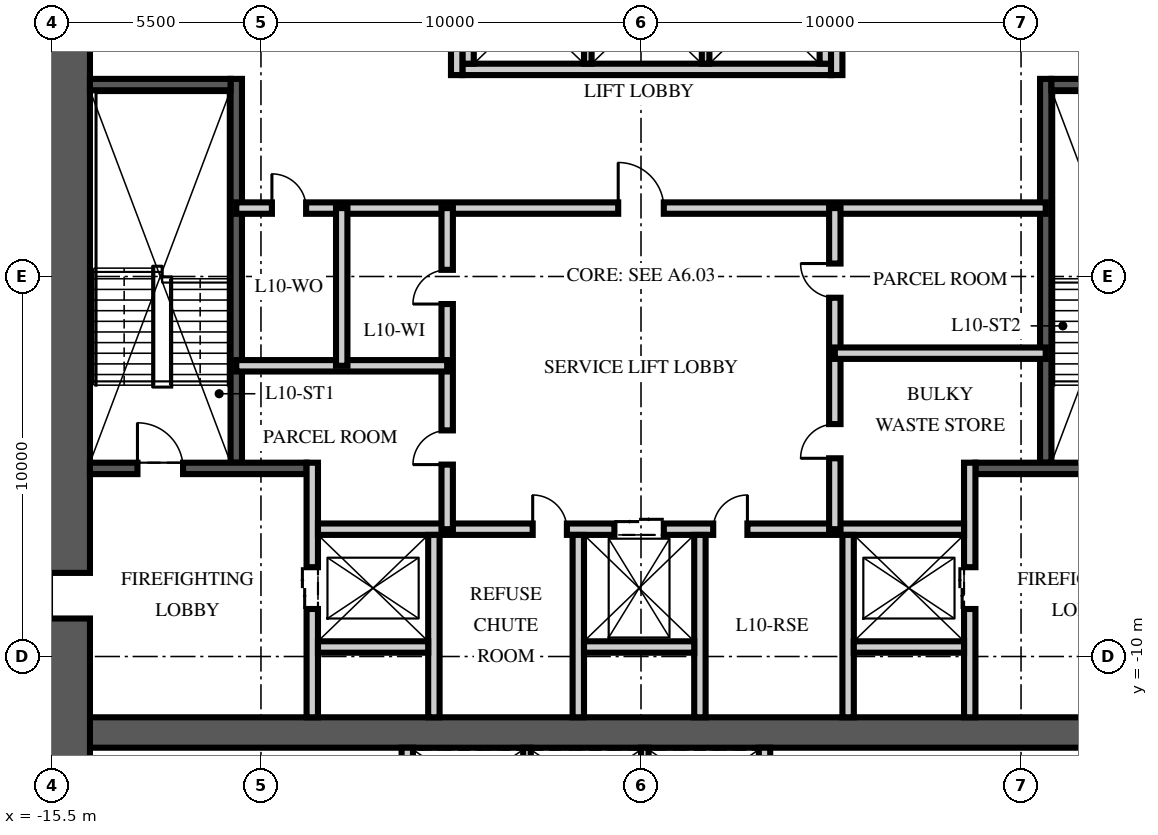
"""IFC4 building model, lengths in metres.
Left out: names, types, materials, properties, quantities, classifications, styles, units other than length and angle.
Written with IfcOpenShell. Run it as: python <this file> out.ifc"""

import sys

from ifc_helpers import new_model, si_unit, direction, frame, frame_2d, origin, place, context, subcontext, project, spatial, rectangle, extrude, element, fill, save


model = new_model("IFC4")
c1 = context("Model", 3, precision=1e-05, world=origin(), true_north=direction((0.0, 1.0)))
c2 = subcontext(c1, "Body", "Model", "MODEL_VIEW")
j1 = project(units=[si_unit("LENGTHUNIT", "METRE"), si_unit("PLANEANGLEUNIT", "RADIAN")], contexts=[c1])
p1 = place(None, origin())
s1 = spatial("IfcSite", under=j1, at=p1, CompositionType="ELEMENT")
p2 = place(p1, origin())
s2 = spatial("IfcBuilding", under=s1, at=p2, CompositionType="ELEMENT")
p3 = place(p2, frame((0.0, 0.0, 43.5)))
s3 = spatial("IfcBuildingStorey", under=s2, at=p3, CompositionType="ELEMENT", Elevation=43.5)
p4 = place(p3, frame((-15.5, -12.0, -0.25), z_axis=(0.0, 0.0, 1.0), x_axis=(1.0, 0.0, 0.0)))
e1 = element("IfcWall", 1, at=p4, inside=s3, PredefinedType="SHEAR", context=c2, shape_type="SweptSolid", body=[
    extrude(rectangle(XDim=31.0, YDim=0.8, at=frame_2d((15.5, 0.0))), origin(), (0.0, 0.0, 1.0), 3.75),
])
p5 = place(p3, frame((-15.5, -15.5, -0.25), z_axis=(0.0, 0.0, 1.0), x_axis=(0.0, 1.0, 0.0)))
e2 = element("IfcWall", 2, at=p5, inside=s3, PredefinedType="SHEAR", context=c2, shape_type="SweptSolid", body=[
    extrude(rectangle(XDim=31.0, YDim=2.0, at=frame_2d((15.5, 0.0))), origin(), (0.0, 0.0, 1.0), 3.75),
])
p6 = place(p5, frame((6.5, 0.0, 0.25)))
e3 = element("IfcOpeningElement", 3, at=p6, cuts=e2, PredefinedType="OPENING", context=c2, shape_type="SweptSolid", body=[
    extrude(rectangle(XDim=1.2, YDim=2.1, at=frame_2d((0.6, 1.05))), frame((0.0, 1.01, 0.0), z_axis=(0.0, -1.0, 0.0), x_axis=(1.0, 0.0, 0.0)), (0.0, 0.0, 1.0), 2.02),
])
p7 = place(p5, frame((23.0, 0.0, 0.25)))
e4 = element("IfcOpeningElement", 4, at=p7, cuts=e2, PredefinedType="OPENING", context=c2, shape_type="SweptSolid", body=[
    extrude(rectangle(XDim=1.8, YDim=2.1, at=frame_2d((0.9, 1.05))), frame((0.0, 1.01, 0.0), z_axis=(0.0, -1.0, 0.0), x_axis=(1.0, 0.0, 0.0)), (0.0, 0.0, 1.0), 2.02),
])
p8 = place(p3, frame((-10.65, -4.9, 0.0), z_axis=(0.0, 0.0, 1.0), x_axis=(0.0, 1.0, 0.0)))
e5 = element("IfcWall", 5, at=p8, inside=s3, PredefinedType="SOLIDWALL", context=c2, shape_type="SweptSolid", body=[
    extrude(rectangle(XDim=10.1, YDim=0.3, at=frame_2d((5.05, 0.0))), origin(), (0.0, 0.0, 1.0), 3.5),
])
p9 = place(p3, frame((-14.5, -5.05, 0.0), z_axis=(0.0, 0.0, 1.0), x_axis=(1.0, 0.0, 0.0)))
e6 = element("IfcWall", 6, at=p9, inside=s3, PredefinedType="SOLIDWALL", context=c2, shape_type="SweptSolid", body=[
    extrude(rectangle(XDim=5.7, YDim=0.3, at=frame_2d((2.85, 0.0))), origin(), (0.0, 0.0, 1.0), 3.5),
])
p10 = place(p9, frame((1.25, 0.0, 0.0)))
e7 = element("IfcOpeningElement", 7, at=p10, cuts=e6, PredefinedType="OPENING", context=c2, shape_type="SweptSolid", body=[
    extrude(rectangle(XDim=1.2, YDim=2.1, at=frame_2d((0.6, 1.05))), frame((0.0, 0.16, 0.0), z_axis=(0.0, -1.0, 0.0), x_axis=(1.0, 0.0, 0.0)), (0.0, 0.0, 1.0), 0.32),
])
p11 = place(p3, frame((-14.5, 5.05, 0.0), z_axis=(0.0, 0.0, 1.0), x_axis=(1.0, 0.0, 0.0)))
e8 = element("IfcWall", 8, at=p11, inside=s3, PredefinedType="SOLIDWALL", context=c2, shape_type="SweptSolid", body=[
    extrude(rectangle(XDim=3.7, YDim=0.3, at=frame_2d((1.85, 0.0))), origin(), (0.0, 0.0, 1.0), 3.5),
])
p12 = place(p3, frame((-8.65, -11.6, 0.0), z_axis=(0.0, 0.0, 1.0), x_axis=(0.0, 1.0, 0.0)))
e9 = element("IfcWall", 9, at=p12, inside=s3, PredefinedType="PARTITIONING", context=c2, shape_type="SweptSolid", body=[
    extrude(rectangle(XDim=6.7, YDim=0.3, at=frame_2d((3.35, 0.0))), origin(), (0.0, 0.0, 1.0), 3.5),
])
p13 = place(p12, frame((2.85, 0.0, 0.0)))
e10 = element("IfcOpeningElement", 10, at=p13, cuts=e9, PredefinedType="OPENING", context=c2, shape_type="SweptSolid", body=[
    extrude(rectangle(XDim=1.1, YDim=2.1, at=frame_2d((0.55, 1.05))), frame((0.0, 0.16, 0.0), z_axis=(0.0, -1.0, 0.0), x_axis=(1.0, 0.0, 0.0)), (0.0, 0.0, 1.0), 0.32),
])
p14 = place(p3, frame((10.65, -4.9, 0.0), z_axis=(0.0, 0.0, 1.0), x_axis=(0.0, 1.0, 0.0)))
e11 = element("IfcWall", 11, at=p14, inside=s3, PredefinedType="SOLIDWALL", context=c2, shape_type="SweptSolid", body=[
    extrude(rectangle(XDim=10.1, YDim=0.3, at=frame_2d((5.05, 0.0))), origin(), (0.0, 0.0, 1.0), 3.5),
])
p15 = place(p3, frame((14.5, -5.05, 0.0), z_axis=(0.0, 0.0, 1.0), x_axis=(-1.0, 0.0, 0.0)))
e12 = element("IfcWall", 12, at=p15, inside=s3, PredefinedType="SOLIDWALL", context=c2, shape_type="SweptSolid", body=[
    extrude(rectangle(XDim=5.7, YDim=0.3, at=frame_2d((2.85, 0.0))), origin(), (0.0, 0.0, 1.0), 3.5),
])
p16 = place(p15, frame((1.25, 0.0, 0.0)))
e13 = element("IfcOpeningElement", 13, at=p16, cuts=e12, PredefinedType="OPENING", context=c2, shape_type="SweptSolid", body=[
    extrude(rectangle(XDim=1.2, YDim=2.1, at=frame_2d((0.6, 1.05))), frame((0.0, 0.16, 0.0), z_axis=(0.0, -1.0, 0.0), x_axis=(1.0, 0.0, 0.0)), (0.0, 0.0, 1.0), 0.32),
])
p17 = place(p3, frame((14.5, 5.05, 0.0), z_axis=(0.0, 0.0, 1.0), x_axis=(-1.0, 0.0, 0.0)))
e14 = element("IfcWall", 14, at=p17, inside=s3, PredefinedType="SOLIDWALL", context=c2, shape_type="SweptSolid", body=[
    extrude(rectangle(XDim=3.7, YDim=0.3, at=frame_2d((1.85, 0.0))), origin(), (0.0, 0.0, 1.0), 3.5),
])
p18 = place(p3, frame((8.65, -11.6, 0.0), z_axis=(0.0, 0.0, 1.0), x_axis=(0.0, 1.0, 0.0)))
e15 = element("IfcWall", 15, at=p18, inside=s3, PredefinedType="PARTITIONING", context=c2, shape_type="SweptSolid", body=[
    extrude(rectangle(XDim=6.7, YDim=0.3, at=frame_2d((3.35, 0.0))), origin(), (0.0, 0.0, 1.0), 3.5),
])
p19 = place(p18, frame((2.85, 0.0, 0.0)))
e16 = element("IfcOpeningElement", 16, at=p19, cuts=e15, PredefinedType="OPENING", context=c2, shape_type="SweptSolid", body=[
    extrude(rectangle(XDim=1.1, YDim=2.1, at=frame_2d((0.55, 1.05))), frame((0.0, 0.16, 0.0), z_axis=(0.0, -1.0, 0.0), x_axis=(1.0, 0.0, 0.0)), (0.0, 0.0, 1.0), 0.32),
])
p20 = place(p3, frame((-8.5, -6.65, 0.0), z_axis=(0.0, 0.0, 1.0), x_axis=(1.0, 0.0, 0.0)))
e17 = element("IfcWall", 17, at=p20, inside=s3, PredefinedType="PARTITIONING", context=c2, shape_type="SweptSolid", body=[
    extrude(rectangle(XDim=17.0, YDim=0.3, at=frame_2d((8.5, 0.0))), origin(), (0.0, 0.0, 1.0), 3.5),
])
p21 = place(p20, frame((7.8, 0.0, 0.0)))
e18 = element("IfcOpeningElement", 18, at=p21, cuts=e17, PredefinedType="OPENING", context=c2, shape_type="SweptSolid", body=[
    extrude(rectangle(XDim=1.3, YDim=2.4, at=frame_2d((0.65, 1.2))), frame((0.0, 0.16, 0.0), z_axis=(0.0, -1.0, 0.0), x_axis=(1.0, 0.0, 0.0)), (0.0, 0.0, 1.0), 0.32),
])
p22 = place(p20, frame((5.65, 0.0, 0.0)))
e19 = element("IfcOpeningElement", 19, at=p22, cuts=e17, PredefinedType="OPENING", context=c2, shape_type="SweptSolid", body=[
    extrude(rectangle(XDim=0.9, YDim=2.1, at=frame_2d((0.45, 1.05))), frame((0.0, 0.16, 0.0), z_axis=(0.0, -1.0, 0.0), x_axis=(1.0, 0.0, 0.0)), (0.0, 0.0, 1.0), 0.32),
])
p23 = place(p20, frame((10.4, 0.0, 0.0)))
e20 = element("IfcOpeningElement", 20, at=p23, cuts=e17, PredefinedType="OPENING", context=c2, shape_type="SweptSolid", body=[
    extrude(rectangle(XDim=0.9, YDim=2.1, at=frame_2d((0.45, 1.05))), frame((0.0, 0.16, 0.0), z_axis=(0.0, -1.0, 0.0), x_axis=(1.0, 0.0, 0.0)), (0.0, 0.0, 1.0), 0.32),
])
for number, where, z_axis, x_axis in (
    (21, (-5.45, -11.6, 0.0), (0.0, 0.0, 1.0), (0.0, 1.0, 0.0)),
    (22, (-1.65, -11.6, 0.0), (0.0, 0.0, 1.0), (0.0, 1.0, 0.0)),
    (23, (1.55, -11.6, 0.0), (0.0, 0.0, 1.0), (0.0, 1.0, 0.0)),
    (24, (5.45, -11.6, 0.0), (0.0, 0.0, 1.0), (0.0, 1.0, 0.0)),
):
    element("IfcWall", number, at=place(p3, frame(where, z_axis=z_axis, x_axis=x_axis)), inside=s3, PredefinedType="PARTITIONING", context=c2, shape_type="SweptSolid", body=[
        extrude(rectangle(XDim=4.8, YDim=0.3, at=frame_2d((2.4, 0.0))), origin(), (0.0, 0.0, 1.0), 3.5),
    ])
for number, where, z_axis, x_axis in (
    (25, (-8.5, -9.75, 0.0), (0.0, 0.0, 1.0), (1.0, 0.0, 0.0)),
    (26, (-1.5, -9.75, 0.0), (0.0, 0.0, 1.0), (1.0, 0.0, 0.0)),
    (27, (5.6, -9.75, 0.0), (0.0, 0.0, 1.0), (1.0, 0.0, 0.0)),
):
    element("IfcWall", number, at=place(p3, frame(where, z_axis=z_axis, x_axis=x_axis)), inside=s3, PredefinedType="PARTITIONING", context=c2, shape_type="SweptSolid", body=[
        extrude(rectangle(XDim=2.9, YDim=0.3, at=frame_2d((1.45, 0.0))), origin(), (0.0, 0.0, 1.0), 3.5),
    ])
p24 = place(p3, frame((-4.7, 5.45, 0.0), z_axis=(0.0, 0.0, 1.0), x_axis=(1.0, 0.0, 0.0)))
e28 = element("IfcWall", 28, at=p24, inside=s3, PredefinedType="PARTITIONING", context=c2, shape_type="SweptSolid", body=[
    extrude(rectangle(XDim=9.7, YDim=0.3, at=frame_2d((4.85, 0.0))), origin(), (0.0, 0.0, 1.0), 3.5),
])
for number, where, z_axis, x_axis in (
    (29, (-4.55, 5.6, 0.0), (0.0, 0.0, 1.0), (0.0, 1.0, 0.0)),
    (30, (4.85, 5.6, 0.0), (0.0, 0.0, 1.0), (0.0, 1.0, 0.0)),
):
    element("IfcWall", number, at=place(p3, frame(where, z_axis=z_axis, x_axis=x_axis)), inside=s3, PredefinedType="PARTITIONING", context=c2, shape_type="SweptSolid", body=[
        extrude(rectangle(XDim=2.8, YDim=0.3, at=frame_2d((1.4, 0.0))), origin(), (0.0, 0.0, 1.0), 3.5),
    ])
for number, where, z_axis, x_axis in (
    (31, (-1.4, 5.6, 0.0), (0.0, 0.0, 1.0), (0.0, 1.0, 0.0)),
    (32, (1.7, 5.6, 0.0), (0.0, 0.0, 1.0), (0.0, 1.0, 0.0)),
):
    element("IfcWall", number, at=place(p3, frame(where, z_axis=z_axis, x_axis=x_axis)), inside=s3, PredefinedType="PARTITIONING", context=c2, shape_type="SweptSolid", body=[
        extrude(rectangle(XDim=2.8, YDim=0.2, at=frame_2d((1.4, 0.0))), origin(), (0.0, 0.0, 1.0), 3.5),
    ])
for number, where, z_axis, x_axis in (
    (33, (-6.15, -14.5, 0.0), (0.0, 0.0, 1.0), (0.0, 1.0, 0.0)),
    (34, (3.25, -14.5, 0.0), (0.0, 0.0, 1.0), (0.0, 1.0, 0.0)),
):
    element("IfcWall", number, at=place(p3, frame(where, z_axis=z_axis, x_axis=x_axis)), inside=s3, PredefinedType="PARTITIONING", context=c2, shape_type="SweptSolid", body=[
        extrude(rectangle(XDim=2.1, YDim=0.3, at=frame_2d((1.05, 0.0))), origin(), (0.0, 0.0, 1.0), 3.5),
    ])
for number, where, z_axis, x_axis in (
    (35, (-3.0, -14.5, 0.0), (0.0, 0.0, 1.0), (0.0, 1.0, 0.0)),
    (36, (0.1, -14.5, 0.0), (0.0, 0.0, 1.0), (0.0, 1.0, 0.0)),
):
    element("IfcWall", number, at=place(p3, frame(where, z_axis=z_axis, x_axis=x_axis)), inside=s3, PredefinedType="PARTITIONING", context=c2, shape_type="SweptSolid", body=[
        extrude(rectangle(XDim=2.1, YDim=0.2, at=frame_2d((1.05, 0.0))), origin(), (0.0, 0.0, 1.0), 3.5),
    ])
p25 = place(p3, frame((-10.65, 1.8, 0.0), z_axis=(0.0, 0.0, 1.0), x_axis=(1.0, 0.0, 0.0)))
e37 = element("IfcWall", 37, at=p25, inside=s3, PredefinedType="PARTITIONING", context=c2, shape_type="SweptSolid", body=[
    extrude(rectangle(XDim=21.3, YDim=0.3, at=frame_2d((10.65, 0.0))), origin(), (0.0, 0.0, 1.0), 3.5),
])
p26 = place(p25, frame((10.05, 0.0, 0.0)))
e38 = element("IfcOpeningElement", 38, at=p26, cuts=e37, PredefinedType="OPENING", context=c2, shape_type="SweptSolid", body=[
    extrude(rectangle(XDim=1.2, YDim=2.1, at=frame_2d((0.6, 1.05))), frame((0.0, 0.16, 0.0), z_axis=(0.0, -1.0, 0.0), x_axis=(1.0, 0.0, 0.0)), (0.0, 0.0, 1.0), 0.32),
])
p27 = place(p25, frame((0.938, 0.0, 0.0)))
e39 = element("IfcOpeningElement", 39, at=p27, cuts=e37, PredefinedType="OPENING", context=c2, shape_type="SweptSolid", body=[
    extrude(rectangle(XDim=0.9, YDim=2.1, at=frame_2d((0.45, 1.05))), frame((0.0, 0.16, 0.0), z_axis=(0.0, -1.0, 0.0), x_axis=(1.0, 0.0, 0.0)), (0.0, 0.0, 1.0), 0.32),
])
p28 = place(p3, frame((-5.1, -6.65, 0.0), z_axis=(0.0, 0.0, 1.0), x_axis=(0.0, 1.0, 0.0)))
e40 = element("IfcWall", 40, at=p28, inside=s3, PredefinedType="PARTITIONING", context=c2, shape_type="SweptSolid", body=[
    extrude(rectangle(XDim=8.45, YDim=0.3, at=frame_2d((4.225, 0.0))), origin(), (0.0, 0.0, 1.0), 3.5),
])
p29 = place(p28, frame((1.7, 0.0, 0.0)))
e41 = element("IfcOpeningElement", 41, at=p29, cuts=e40, PredefinedType="OPENING", context=c2, shape_type="SweptSolid", body=[
    extrude(rectangle(XDim=0.9, YDim=2.1, at=frame_2d((0.45, 1.05))), frame((0.0, 0.16, 0.0), z_axis=(0.0, -1.0, 0.0), x_axis=(1.0, 0.0, 0.0)), (0.0, 0.0, 1.0), 0.32),
])
p30 = place(p28, frame((5.925, 0.0, 0.0)))
e42 = element("IfcOpeningElement", 42, at=p30, cuts=e40, PredefinedType="OPENING", context=c2, shape_type="SweptSolid", body=[
    extrude(rectangle(XDim=0.9, YDim=2.1, at=frame_2d((0.45, 1.05))), frame((0.0, 0.16, 0.0), z_axis=(0.0, -1.0, 0.0), x_axis=(1.0, 0.0, 0.0)), (0.0, 0.0, 1.0), 0.32),
])
p31 = place(p3, frame((5.1, -6.65, 0.0), z_axis=(0.0, 0.0, 1.0), x_axis=(0.0, 1.0, 0.0)))
e43 = element("IfcWall", 43, at=p31, inside=s3, PredefinedType="PARTITIONING", context=c2, shape_type="SweptSolid", body=[
    extrude(rectangle(XDim=8.45, YDim=0.3, at=frame_2d((4.225, 0.0))), origin(), (0.0, 0.0, 1.0), 3.5),
])
p32 = place(p31, frame((1.866, 0.0, 0.0)))
e44 = element("IfcOpeningElement", 44, at=p32, cuts=e43, PredefinedType="OPENING", context=c2, shape_type="SweptSolid", body=[
    extrude(rectangle(XDim=0.9, YDim=2.1, at=frame_2d((0.45, 1.05))), frame((0.0, 0.16, 0.0), z_axis=(0.0, -1.0, 0.0), x_axis=(1.0, 0.0, 0.0)), (0.0, 0.0, 1.0), 0.32),
])
p33 = place(p31, frame((6.091, 0.0, 0.0)))
e45 = element("IfcOpeningElement", 45, at=p33, cuts=e43, PredefinedType="OPENING", context=c2, shape_type="SweptSolid", body=[
    extrude(rectangle(XDim=0.9, YDim=2.1, at=frame_2d((0.45, 1.05))), frame((0.0, 0.16, 0.0), z_axis=(0.0, -1.0, 0.0), x_axis=(1.0, 0.0, 0.0)), (0.0, 0.0, 1.0), 0.32),
])
p34 = place(p3, frame((-10.65, -2.35, 0.0), z_axis=(0.0, 0.0, 1.0), x_axis=(1.0, 0.0, 0.0)))
e46 = element("IfcWall", 46, at=p34, inside=s3, PredefinedType="PARTITIONING", context=c2, shape_type="SweptSolid", body=[
    extrude(rectangle(XDim=5.55, YDim=0.3, at=frame_2d((2.775, 0.0))), origin(), (0.0, 0.0, 1.0), 3.5),
])
p35 = place(p3, frame((-7.875, -2.35, 0.0), z_axis=(0.0, 0.0, 1.0), x_axis=(0.0, 1.0, 0.0)))
e47 = element("IfcWall", 47, at=p35, inside=s3, PredefinedType="PARTITIONING", context=c2, shape_type="SweptSolid", body=[
    extrude(rectangle(XDim=4.15, YDim=0.3, at=frame_2d((2.075, 0.0))), origin(), (0.0, 0.0, 1.0), 3.5),
])
p36 = place(p3, frame((10.65, -2.018, 0.0), z_axis=(0.0, 0.0, 1.0), x_axis=(-1.0, 0.0, 0.0)))
e48 = element("IfcWall", 48, at=p36, inside=s3, PredefinedType="PARTITIONING", context=c2, shape_type="SweptSolid", body=[
    extrude(rectangle(XDim=5.55, YDim=0.3, at=frame_2d((2.775, 0.0))), origin(), (0.0, 0.0, 1.0), 3.5),
])
p37 = place(p3, frame((-4.85, 5.3, 0.0), z_axis=(0.0, 0.0, 1.0), x_axis=(0.0, 1.0, 0.0)))
e49 = element("IfcWall", 49, at=p37, inside=s3, PredefinedType="PARTITIONING", context=c2, shape_type="SweptSolid", body=[
    extrude(rectangle(XDim=6.3, YDim=0.3, at=frame_2d((3.15, 0.0))), origin(), (0.0, 0.0, 1.0), 3.5),
])
p38 = place(p37, frame((4.35, 0.0, 0.0)))
e50 = element("IfcOpeningElement", 50, at=p38, cuts=e49, PredefinedType="OPENING", context=c2, shape_type="SweptSolid", body=[
    extrude(rectangle(XDim=0.9, YDim=2.1, at=frame_2d((0.45, 1.05))), frame((0.0, 0.16, 0.0), z_axis=(0.0, -1.0, 0.0), x_axis=(1.0, 0.0, 0.0)), (0.0, 0.0, 1.0), 0.32),
])
p39 = place(p3, frame((5.15, 5.3, 0.0), z_axis=(0.0, 0.0, 1.0), x_axis=(0.0, 1.0, 0.0)))
e51 = element("IfcWall", 51, at=p39, inside=s3, PredefinedType="PARTITIONING", context=c2, shape_type="SweptSolid", body=[
    extrude(rectangle(XDim=6.3, YDim=0.3, at=frame_2d((3.15, 0.0))), origin(), (0.0, 0.0, 1.0), 3.5),
])
p40 = place(p10, origin())
e52 = element("IfcDoor", 52, at=p40, inside=s3, OperationType="SINGLE_SWING_LEFT", PredefinedType="DOOR", context=c2, shape_type="SweptSolid", body=[
    extrude(rectangle(XDim=1.2, YDim=2.1, at=frame_2d((0.6, 1.05))), frame((0.0, 0.025, 0.0), z_axis=(0.0, -1.0, 0.0), x_axis=(1.0, 0.0, 0.0)), (0.0, 0.0, 1.0), 0.05),
])
fill(e7, e52)
p41 = place(p6, origin())
e53 = element("IfcDoor", 53, at=p41, inside=s3, OperationType="SINGLE_SWING_LEFT", PredefinedType="DOOR", context=c2, shape_type="SweptSolid", body=[
    extrude(rectangle(XDim=1.2, YDim=2.1, at=frame_2d((0.6, 1.05))), frame((0.0, 0.025, 0.0), z_axis=(0.0, -1.0, 0.0), x_axis=(1.0, 0.0, 0.0)), (0.0, 0.0, 1.0), 0.05),
])
fill(e3, e53)
p42 = place(p13, origin())
e54 = element("IfcDoor", 54, at=p42, inside=s3, OperationType="DOUBLE_DOOR_SLIDING", PredefinedType="DOOR", context=c2, shape_type="SweptSolid", body=[
    extrude(rectangle(XDim=1.1, YDim=2.1, at=frame_2d((0.55, 1.05))), frame((0.0, 0.025, 0.0), z_axis=(0.0, -1.0, 0.0), x_axis=(1.0, 0.0, 0.0)), (0.0, 0.0, 1.0), 0.05),
])
fill(e10, e54)
p43 = place(p19, origin())
e55 = element("IfcDoor", 55, at=p43, inside=s3, OperationType="DOUBLE_DOOR_SLIDING", PredefinedType="DOOR", context=c2, shape_type="SweptSolid", body=[
    extrude(rectangle(XDim=1.1, YDim=2.1, at=frame_2d((0.55, 1.05))), frame((0.0, 0.025, 0.0), z_axis=(0.0, -1.0, 0.0), x_axis=(1.0, 0.0, 0.0)), (0.0, 0.0, 1.0), 0.05),
])
fill(e16, e55)
p44 = place(p21, origin())
e56 = element("IfcDoor", 56, at=p44, inside=s3, OperationType="DOUBLE_DOOR_SLIDING", PredefinedType="DOOR", context=c2, shape_type="SweptSolid", body=[
    extrude(rectangle(XDim=1.3, YDim=2.4, at=frame_2d((0.65, 1.2))), frame((0.0, 0.025, 0.0), z_axis=(0.0, -1.0, 0.0), x_axis=(1.0, 0.0, 0.0)), (0.0, 0.0, 1.0), 0.05),
])
fill(e18, e56)
p45 = place(p26, origin())
e57 = element("IfcDoor", 57, at=p45, inside=s3, OperationType="SINGLE_SWING_LEFT", PredefinedType="DOOR", context=c2, shape_type="SweptSolid", body=[
    extrude(rectangle(XDim=1.2, YDim=2.1, at=frame_2d((0.6, 1.05))), frame((0.0, 0.025, 0.0), z_axis=(0.0, -1.0, 0.0), x_axis=(1.0, 0.0, 0.0)), (0.0, 0.0, 1.0), 0.05),
])
fill(e38, e57)
p46 = place(p22, origin())
e58 = element("IfcDoor", 58, at=p46, inside=s3, OperationType="SINGLE_SWING_LEFT", PredefinedType="DOOR", context=c2, shape_type="SweptSolid", body=[
    extrude(rectangle(XDim=0.9, YDim=2.1, at=frame_2d((0.45, 1.05))), frame((0.0, 0.025, 0.0), z_axis=(0.0, -1.0, 0.0), x_axis=(1.0, 0.0, 0.0)), (0.0, 0.0, 1.0), 0.05),
])
fill(e19, e58)
p47 = place(p23, origin())
e59 = element("IfcDoor", 59, at=p47, inside=s3, OperationType="SINGLE_SWING_RIGHT", PredefinedType="DOOR", context=c2, shape_type="SweptSolid", body=[
    extrude(rectangle(XDim=0.9, YDim=2.1, at=frame_2d((0.45, 1.05))), frame((0.0, 0.025, 0.0), z_axis=(0.0, -1.0, 0.0), x_axis=(1.0, 0.0, 0.0)), (0.0, 0.0, 1.0), 0.05),
])
fill(e20, e59)
p48 = place(p29, origin())
e60 = element("IfcDoor", 60, at=p48, inside=s3, OperationType="SINGLE_SWING_LEFT", PredefinedType="DOOR", context=c2, shape_type="SweptSolid", body=[
    extrude(rectangle(XDim=0.9, YDim=2.1, at=frame_2d((0.45, 1.05))), frame((0.0, 0.025, 0.0), z_axis=(0.0, -1.0, 0.0), x_axis=(1.0, 0.0, 0.0)), (0.0, 0.0, 1.0), 0.05),
])
fill(e41, e60)
p49 = place(p30, origin())
e61 = element("IfcDoor", 61, at=p49, inside=s3, OperationType="SINGLE_SWING_LEFT", PredefinedType="DOOR", context=c2, shape_type="SweptSolid", body=[
    extrude(rectangle(XDim=0.9, YDim=2.1, at=frame_2d((0.45, 1.05))), frame((0.0, 0.025, 0.0), z_axis=(0.0, -1.0, 0.0), x_axis=(1.0, 0.0, 0.0)), (0.0, 0.0, 1.0), 0.05),
])
fill(e42, e61)
p50 = place(p27, origin())
e62 = element("IfcDoor", 62, at=p50, inside=s3, OperationType="SINGLE_SWING_LEFT", PredefinedType="DOOR", context=c2, shape_type="SweptSolid", body=[
    extrude(rectangle(XDim=0.9, YDim=2.1, at=frame_2d((0.45, 1.05))), frame((0.0, 0.025, 0.0), z_axis=(0.0, -1.0, 0.0), x_axis=(1.0, 0.0, 0.0)), (0.0, 0.0, 1.0), 0.05),
])
fill(e39, e62)
p51 = place(p32, origin())
e63 = element("IfcDoor", 63, at=p51, inside=s3, OperationType="SINGLE_SWING_LEFT", PredefinedType="DOOR", context=c2, shape_type="SweptSolid", body=[
    extrude(rectangle(XDim=0.9, YDim=2.1, at=frame_2d((0.45, 1.05))), frame((0.0, 0.025, 0.0), z_axis=(0.0, -1.0, 0.0), x_axis=(1.0, 0.0, 0.0)), (0.0, 0.0, 1.0), 0.05),
])
fill(e44, e63)
p52 = place(p33, origin())
e64 = element("IfcDoor", 64, at=p52, inside=s3, OperationType="SINGLE_SWING_RIGHT", PredefinedType="DOOR", context=c2, shape_type="SweptSolid", body=[
    extrude(rectangle(XDim=0.9, YDim=2.1, at=frame_2d((0.45, 1.05))), frame((0.0, 0.025, 0.0), z_axis=(0.0, -1.0, 0.0), x_axis=(1.0, 0.0, 0.0)), (0.0, 0.0, 1.0), 0.05),
])
fill(e45, e64)
save(model, sys.argv[1])
